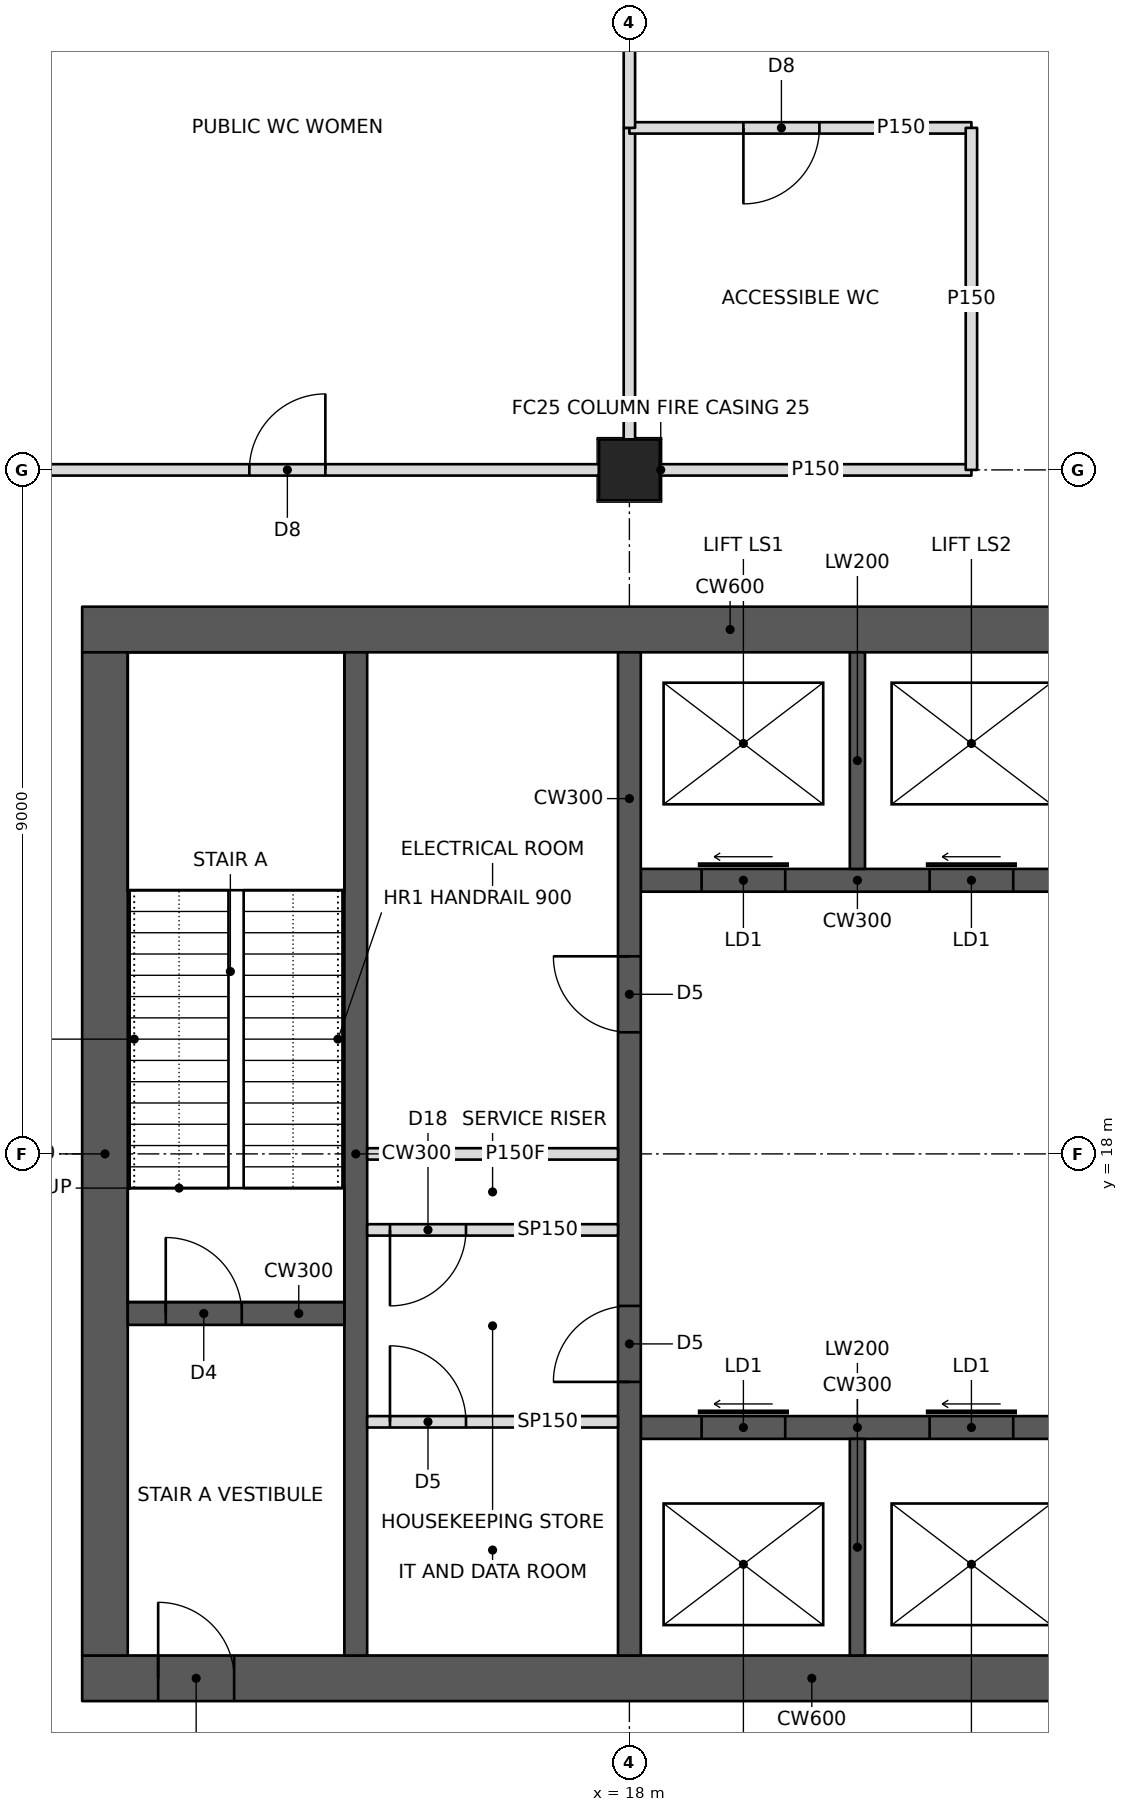
"""IFC4 building model, lengths in metres.
Left out: names, types, materials, properties, quantities, classifications, styles, units other than length and angle.
Written with IfcOpenShell. Run it as: python <this file> out.ifc"""

import sys

from ifc_helpers import new_model, si_unit, direction, frame, frame_2d, origin, origin_2d, place, context, subcontext, project, spatial, rectangle, hollow_rectangle, extrude, element, fill, save


model = new_model("IFC4")
c1 = context("Model", 3, precision=1e-05, world=origin(), true_north=direction((0.0, 1.0)))
c2 = subcontext(c1, "Body", "Model", "MODEL_VIEW")
j1 = project(units=[si_unit("LENGTHUNIT", "METRE"), si_unit("PLANEANGLEUNIT", "RADIAN")], contexts=[c1])
p1 = place(None, origin())
s1 = spatial("IfcSite", under=j1, at=p1, CompositionType="ELEMENT")
p2 = place(p1, origin())
s2 = spatial("IfcBuilding", under=s1, at=p2, CompositionType="ELEMENT")
p3 = place(p2, frame((0.0, 0.0, 23.0)))
s3 = spatial("IfcBuildingStorey", under=s2, at=p3, CompositionType="ELEMENT", Elevation=23.0)
p4 = place(p3, frame((18.0, 27.0, 0.0), z_axis=(0.0, 0.0, 1.0), x_axis=(1.0, 0.0, 0.0)))
e1 = element("IfcColumn", 1, at=p4, inside=s3, PredefinedType="COLUMN", context=c2, shape_type="SweptSolid", body=[
    extrude(hollow_rectangle(XDim=0.8, YDim=0.8, WallThickness=0.1, at=origin_2d()), origin(), (0.0, 0.0, 1.0), 5.0),
])
p5 = place(p3, frame((10.8, 11.1, 0.0), z_axis=(0.0, 0.0, 1.0), x_axis=(1.0, 0.0, 0.0)))
e2 = element("IfcWall", 2, at=p5, inside=s3, PredefinedType="SHEAR", context=c2, shape_type="SweptSolid", body=[
    extrude(rectangle(XDim=23.4, YDim=0.6, at=frame_2d((11.7, 0.0))), origin(), (0.0, 0.0, 1.0), 5.0),
])
p6 = place(p5, frame((1.0, 0.0, 0.0)))
e3 = element("IfcOpeningElement", 3, at=p6, cuts=e2, PredefinedType="OPENING", context=c2, shape_type="SweptSolid", body=[
    extrude(rectangle(XDim=1.0, YDim=2.1, at=frame_2d((0.5, 1.05))), frame((0.0, 0.31, 0.0), z_axis=(0.0, -1.0, 0.0), x_axis=(1.0, 0.0, 0.0)), (0.0, 0.0, 1.0), 0.62),
])
p7 = place(p5, frame((17.2, 0.0, 0.0)))
e4 = element("IfcOpeningElement", 4, at=p7, cuts=e2, PredefinedType="OPENING", context=c2, shape_type="SweptSolid", body=[
    extrude(rectangle(XDim=1.8, YDim=2.1, at=frame_2d((0.9, 1.05))), frame((0.0, 0.31, 0.0), z_axis=(0.0, -1.0, 0.0), x_axis=(1.0, 0.0, 0.0)), (0.0, 0.0, 1.0), 0.62),
])
p8 = place(p3, frame((10.8, 24.9, 0.0), z_axis=(0.0, 0.0, 1.0), x_axis=(1.0, 0.0, 0.0)))
e5 = element("IfcWall", 5, at=p8, inside=s3, PredefinedType="SHEAR", context=c2, shape_type="SweptSolid", body=[
    extrude(rectangle(XDim=23.4, YDim=0.6, at=frame_2d((11.7, 0.0))), origin(), (0.0, 0.0, 1.0), 5.0),
])
p9 = place(p8, frame((17.2, 0.0, 0.0)))
e6 = element("IfcOpeningElement", 6, at=p9, cuts=e5, PredefinedType="OPENING", context=c2, shape_type="SweptSolid", body=[
    extrude(rectangle(XDim=1.8, YDim=2.1, at=frame_2d((0.9, 1.05))), frame((0.0, 0.31, 0.0), z_axis=(0.0, -1.0, 0.0), x_axis=(1.0, 0.0, 0.0)), (0.0, 0.0, 1.0), 0.62),
])
p10 = place(p8, frame((21.1, 0.0, 0.0)))
e7 = element("IfcOpeningElement", 7, at=p10, cuts=e5, PredefinedType="OPENING", context=c2, shape_type="SweptSolid", body=[
    extrude(rectangle(XDim=1.0, YDim=2.1, at=frame_2d((0.5, 1.05))), frame((0.0, 0.31, 0.0), z_axis=(0.0, -1.0, 0.0), x_axis=(1.0, 0.0, 0.0)), (0.0, 0.0, 1.0), 0.62),
])
p11 = place(p3, frame((11.1, 11.4, 0.0), z_axis=(0.0, 0.0, 1.0), x_axis=(0.0, 1.0, 0.0)))
e8 = element("IfcWall", 8, at=p11, inside=s3, PredefinedType="SHEAR", context=c2, shape_type="SweptSolid", body=[
    extrude(rectangle(XDim=13.2, YDim=0.6, at=frame_2d((6.6, 0.0))), origin(), (0.0, 0.0, 1.0), 5.0),
])
p12 = place(p3, frame((14.4, 11.4, 0.0), z_axis=(0.0, 0.0, 1.0), x_axis=(0.0, 1.0, 0.0)))
e9 = element("IfcWall", 9, at=p12, inside=s3, PredefinedType="SHEAR", context=c2, shape_type="SweptSolid", body=[
    extrude(rectangle(XDim=13.2, YDim=0.3, at=frame_2d((6.6, 0.0))), origin(), (0.0, 0.0, 1.0), 5.0),
])
p13 = place(p3, frame((11.4, 15.9, 0.0), z_axis=(0.0, 0.0, 1.0), x_axis=(1.0, 0.0, 0.0)))
e10 = element("IfcWall", 10, at=p13, inside=s3, PredefinedType="SHEAR", context=c2, shape_type="SweptSolid", body=[
    extrude(rectangle(XDim=2.85, YDim=0.3, at=frame_2d((1.425, 0.0))), origin(), (0.0, 0.0, 1.0), 5.0),
])
p14 = place(p13, frame((0.5, 0.0, 0.0)))
e11 = element("IfcOpeningElement", 11, at=p14, cuts=e10, PredefinedType="OPENING", context=c2, shape_type="SweptSolid", body=[
    extrude(rectangle(XDim=1.0, YDim=2.1, at=frame_2d((0.5, 1.05))), frame((0.0, 0.16, 0.0), z_axis=(0.0, -1.0, 0.0), x_axis=(1.0, 0.0, 0.0)), (0.0, 0.0, 1.0), 0.32),
])
p15 = place(p3, frame((18.0, 11.4, 0.0), z_axis=(0.0, 0.0, 1.0), x_axis=(0.0, 1.0, 0.0)))
e12 = element("IfcWall", 12, at=p15, inside=s3, PredefinedType="SHEAR", context=c2, shape_type="SweptSolid", body=[
    extrude(rectangle(XDim=13.2, YDim=0.3, at=frame_2d((6.6, 0.0))), origin(), (0.0, 0.0, 1.0), 5.0),
])
p16 = place(p15, frame((3.6, 0.0, 0.0)))
e13 = element("IfcOpeningElement", 13, at=p16, cuts=e12, PredefinedType="OPENING", context=c2, shape_type="SweptSolid", body=[
    extrude(rectangle(XDim=1.0, YDim=2.1, at=frame_2d((0.5, 1.05))), frame((0.0, 0.16, 0.0), z_axis=(0.0, -1.0, 0.0), x_axis=(1.0, 0.0, 0.0)), (0.0, 0.0, 1.0), 0.32),
])
p17 = place(p15, frame((8.2, 0.0, 0.0)))
e14 = element("IfcOpeningElement", 14, at=p17, cuts=e12, PredefinedType="OPENING", context=c2, shape_type="SweptSolid", body=[
    extrude(rectangle(XDim=1.0, YDim=2.1, at=frame_2d((0.5, 1.05))), frame((0.0, 0.16, 0.0), z_axis=(0.0, -1.0, 0.0), x_axis=(1.0, 0.0, 0.0)), (0.0, 0.0, 1.0), 0.32),
])
p18 = place(p3, frame((14.55, 18.0, 0.0), z_axis=(0.0, 0.0, 1.0), x_axis=(1.0, 0.0, 0.0)))
e15 = element("IfcWall", 15, at=p18, inside=s3, PredefinedType="PARTITIONING", context=c2, shape_type="SweptSolid", body=[
    extrude(rectangle(XDim=3.3, YDim=0.15, at=frame_2d((1.65, 0.0))), origin(), (0.0, 0.0, 1.0), 4.8),
])
p19 = place(p3, frame((18.15, 14.4, 0.0), z_axis=(0.0, 0.0, 1.0), x_axis=(1.0, 0.0, 0.0)))
e16 = element("IfcWall", 16, at=p19, inside=s3, PredefinedType="SHEAR", context=c2, shape_type="SweptSolid", body=[
    extrude(rectangle(XDim=9.0, YDim=0.3, at=frame_2d((4.5, 0.0))), origin(), (0.0, 0.0, 1.0), 5.0),
])
p20 = place(p19, frame((0.8, 0.0, 0.0)))
e17 = element("IfcOpeningElement", 17, at=p20, cuts=e16, PredefinedType="OPENING", context=c2, shape_type="SweptSolid", body=[
    extrude(rectangle(XDim=1.1, YDim=2.1, at=frame_2d((0.55, 1.05))), frame((0.0, 0.16, 0.0), z_axis=(0.0, -1.0, 0.0), x_axis=(1.0, 0.0, 0.0)), (0.0, 0.0, 1.0), 0.32),
])
p21 = place(p19, frame((3.8, 0.0, 0.0)))
e18 = element("IfcOpeningElement", 18, at=p21, cuts=e16, PredefinedType="OPENING", context=c2, shape_type="SweptSolid", body=[
    extrude(rectangle(XDim=1.1, YDim=2.1, at=frame_2d((0.55, 1.05))), frame((0.0, 0.16, 0.0), z_axis=(0.0, -1.0, 0.0), x_axis=(1.0, 0.0, 0.0)), (0.0, 0.0, 1.0), 0.32),
])
p22 = place(p19, frame((6.75, 0.0, 0.0)))
e19 = element("IfcOpeningElement", 19, at=p22, cuts=e16, PredefinedType="OPENING", context=c2, shape_type="SweptSolid", body=[
    extrude(rectangle(XDim=1.2, YDim=2.1, at=frame_2d((0.6, 1.05))), frame((0.0, 0.16, 0.0), z_axis=(0.0, -1.0, 0.0), x_axis=(1.0, 0.0, 0.0)), (0.0, 0.0, 1.0), 0.32),
])
p23 = place(p3, frame((21.0, 11.4, 0.0), z_axis=(0.0, 0.0, 1.0), x_axis=(0.0, 1.0, 0.0)))
e20 = element("IfcWall", 20, at=p23, inside=s3, PredefinedType="SHEAR", context=c2, shape_type="SweptSolid", body=[
    extrude(rectangle(XDim=2.85, YDim=0.2, at=frame_2d((1.425, 0.0))), origin(), (0.0, 0.0, 1.0), 5.0),
])
p24 = place(p3, frame((18.15, 21.6, 0.0), z_axis=(0.0, 0.0, 1.0), x_axis=(1.0, 0.0, 0.0)))
e21 = element("IfcWall", 21, at=p24, inside=s3, PredefinedType="SHEAR", context=c2, shape_type="SweptSolid", body=[
    extrude(rectangle(XDim=9.0, YDim=0.3, at=frame_2d((4.5, 0.0))), origin(), (0.0, 0.0, 1.0), 5.0),
])
p25 = place(p24, frame((0.8, 0.0, 0.0)))
e22 = element("IfcOpeningElement", 22, at=p25, cuts=e21, PredefinedType="OPENING", context=c2, shape_type="SweptSolid", body=[
    extrude(rectangle(XDim=1.1, YDim=2.1, at=frame_2d((0.55, 1.05))), frame((0.0, 0.16, 0.0), z_axis=(0.0, -1.0, 0.0), x_axis=(1.0, 0.0, 0.0)), (0.0, 0.0, 1.0), 0.32),
])
p26 = place(p24, frame((3.8, 0.0, 0.0)))
e23 = element("IfcOpeningElement", 23, at=p26, cuts=e21, PredefinedType="OPENING", context=c2, shape_type="SweptSolid", body=[
    extrude(rectangle(XDim=1.1, YDim=2.1, at=frame_2d((0.55, 1.05))), frame((0.0, 0.16, 0.0), z_axis=(0.0, -1.0, 0.0), x_axis=(1.0, 0.0, 0.0)), (0.0, 0.0, 1.0), 0.32),
])
p27 = place(p24, frame((6.75, 0.0, 0.0)))
e24 = element("IfcOpeningElement", 24, at=p27, cuts=e21, PredefinedType="OPENING", context=c2, shape_type="SweptSolid", body=[
    extrude(rectangle(XDim=1.2, YDim=2.1, at=frame_2d((0.6, 1.05))), frame((0.0, 0.16, 0.0), z_axis=(0.0, -1.0, 0.0), x_axis=(1.0, 0.0, 0.0)), (0.0, 0.0, 1.0), 0.32),
])
p28 = place(p3, frame((21.0, 21.75, 0.0), z_axis=(0.0, 0.0, 1.0), x_axis=(0.0, 1.0, 0.0)))
e25 = element("IfcWall", 25, at=p28, inside=s3, PredefinedType="SHEAR", context=c2, shape_type="SweptSolid", body=[
    extrude(rectangle(XDim=2.85, YDim=0.2, at=frame_2d((1.425, 0.0))), origin(), (0.0, 0.0, 1.0), 5.0),
])
p29 = place(p3, frame((17.6, 27.0, 0.0), z_axis=(0.0, 0.0, 1.0), x_axis=(-1.0, 0.0, 0.0)))
e26 = element("IfcWall", 26, at=p29, inside=s3, PredefinedType="PARTITIONING", context=c2, shape_type="SweptSolid", body=[
    extrude(rectangle(XDim=8.2, YDim=0.15, at=frame_2d((4.1, 0.0))), origin(), (0.0, 0.0, 1.0), 4.005),
])
p30 = place(p29, frame((3.6, 0.0, 0.0)))
e27 = element("IfcOpeningElement", 27, at=p30, cuts=e26, PredefinedType="OPENING", context=c2, shape_type="SweptSolid", body=[
    extrude(rectangle(XDim=1.0, YDim=2.1, at=frame_2d((0.5, 1.05))), frame((0.0, 0.085, 0.0), z_axis=(0.0, -1.0, 0.0), x_axis=(1.0, 0.0, 0.0)), (0.0, 0.0, 1.0), 0.17),
])
for number, where, z_axis, x_axis in (
    (28, (22.5, 27.0, 0.0), (0.0, 0.0, 1.0), (-1.0, 0.0, 0.0)),
    (29, (18.0, 31.5, 0.0), (0.0, 0.0, 1.0), (0.0, -1.0, 0.0)),
):
    element("IfcWall", number, at=place(p3, frame(where, z_axis=z_axis, x_axis=x_axis)), inside=s3, PredefinedType="PARTITIONING", context=c2, shape_type="SweptSolid", body=[
        extrude(rectangle(XDim=4.1, YDim=0.15, at=frame_2d((2.05, 0.0))), origin(), (0.0, 0.0, 1.0), 4.005),
    ])
p31 = place(p3, frame((18.0, 31.5, 0.0), z_axis=(0.0, 0.0, 1.0), x_axis=(1.0, 0.0, 0.0)))
e30 = element("IfcWall", 30, at=p31, inside=s3, PredefinedType="PARTITIONING", context=c2, shape_type="SweptSolid", body=[
    extrude(rectangle(XDim=4.5, YDim=0.15, at=frame_2d((2.25, 0.0))), origin(), (0.0, 0.0, 1.0), 4.004),
])
p32 = place(p31, frame((1.5, 0.0, 0.0)))
e31 = element("IfcOpeningElement", 31, at=p32, cuts=e30, PredefinedType="OPENING", context=c2, shape_type="SweptSolid", body=[
    extrude(rectangle(XDim=1.0, YDim=2.1, at=frame_2d((0.5, 1.05))), frame((0.0, 0.085, 0.0), z_axis=(0.0, -1.0, 0.0), x_axis=(1.0, 0.0, 0.0)), (0.0, 0.0, 1.0), 0.17),
])
p33 = place(p3, frame((18.0, 35.6, 0.0), z_axis=(0.0, 0.0, 1.0), x_axis=(0.0, -1.0, 0.0)))
e32 = element("IfcWall", 32, at=p33, inside=s3, PredefinedType="PARTITIONING", context=c2, shape_type="SweptSolid", body=[
    extrude(rectangle(XDim=4.1, YDim=0.15, at=frame_2d((2.05, 0.0))), origin(), (0.0, 0.0, 1.0), 4.005),
])
p34 = place(p3, frame((22.5, 31.5, 0.0), z_axis=(0.0, 0.0, 1.0), x_axis=(0.0, -1.0, 0.0)))
e33 = element("IfcWall", 33, at=p34, inside=s3, PredefinedType="PARTITIONING", context=c2, shape_type="SweptSolid", body=[
    extrude(rectangle(XDim=4.5, YDim=0.15, at=frame_2d((2.25, 0.0))), origin(), (0.0, 0.0, 1.0), 4.004),
])
p35 = place(p3, frame((14.55, 17.0, 0.0), z_axis=(0.0, 0.0, 1.0), x_axis=(1.0, 0.0, 0.0)))
e34 = element("IfcWall", 34, at=p35, inside=s3, PredefinedType="PARTITIONING", context=c2, shape_type="SweptSolid", body=[
    extrude(rectangle(XDim=3.3, YDim=0.15, at=frame_2d((1.65, 0.0))), origin(), (0.0, 0.0, 1.0), 4.8),
])
p36 = place(p35, frame((0.3, 0.0, 0.0)))
e35 = element("IfcOpeningElement", 35, at=p36, cuts=e34, PredefinedType="OPENING", context=c2, shape_type="SweptSolid", body=[
    extrude(rectangle(XDim=1.0, YDim=2.1, at=frame_2d((0.5, 1.05))), frame((0.0, 0.085, 0.0), z_axis=(0.0, -1.0, 0.0), x_axis=(1.0, 0.0, 0.0)), (0.0, 0.0, 1.0), 0.17),
])
p37 = place(p3, frame((14.55, 14.475, 0.0), z_axis=(0.0, 0.0, 1.0), x_axis=(1.0, 0.0, 0.0)))
e36 = element("IfcWall", 36, at=p37, inside=s3, PredefinedType="PARTITIONING", context=c2, shape_type="SweptSolid", body=[
    extrude(rectangle(XDim=3.3, YDim=0.15, at=frame_2d((1.65, 0.0))), origin(), (0.0, 0.0, 1.0), 4.8),
])
p38 = place(p37, frame((0.3, 0.0, 0.0)))
e37 = element("IfcOpeningElement", 37, at=p38, cuts=e36, PredefinedType="OPENING", context=c2, shape_type="SweptSolid", body=[
    extrude(rectangle(XDim=1.0, YDim=2.1, at=frame_2d((0.5, 1.05))), frame((0.0, 0.085, 0.0), z_axis=(0.0, -1.0, 0.0), x_axis=(1.0, 0.0, 0.0)), (0.0, 0.0, 1.0), 0.17),
])
p39 = place(p30, frame((1.0, 0.0, 0.0), z_axis=(0.0, 0.0, 1.0), x_axis=(-1.0, 0.0, 0.0)))
e38 = element("IfcDoor", 38, at=p39, inside=s3, OperationType="SINGLE_SWING_RIGHT", PredefinedType="DOOR", context=c2, shape_type="SweptSolid", body=[
    extrude(rectangle(XDim=1.0, YDim=2.1, at=frame_2d((0.5, 1.05))), frame((0.0, 0.025, 0.0), z_axis=(0.0, -1.0, 0.0), x_axis=(1.0, 0.0, 0.0)), (0.0, 0.0, 1.0), 0.05),
])
fill(e27, e38)
p40 = place(p32, frame((1.0, 0.0, 0.0), z_axis=(0.0, 0.0, 1.0), x_axis=(-1.0, 0.0, 0.0)))
e39 = element("IfcDoor", 39, at=p40, inside=s3, OperationType="SINGLE_SWING_RIGHT", PredefinedType="DOOR", context=c2, shape_type="SweptSolid", body=[
    extrude(rectangle(XDim=1.0, YDim=2.1, at=frame_2d((0.5, 1.05))), frame((0.0, 0.025, 0.0), z_axis=(0.0, -1.0, 0.0), x_axis=(1.0, 0.0, 0.0)), (0.0, 0.0, 1.0), 0.05),
])
fill(e31, e39)
p41 = place(p36, frame((1.0, 0.0, 0.0), z_axis=(0.0, 0.0, 1.0), x_axis=(-1.0, 0.0, 0.0)))
e40 = element("IfcDoor", 40, at=p41, inside=s3, OperationType="SINGLE_SWING_RIGHT", PredefinedType="DOOR", context=c2, shape_type="SweptSolid", body=[
    extrude(rectangle(XDim=1.0, YDim=2.1, at=frame_2d((0.5, 1.05))), frame((0.0, 0.025, 0.0), z_axis=(0.0, -1.0, 0.0), x_axis=(1.0, 0.0, 0.0)), (0.0, 0.0, 1.0), 0.05),
])
fill(e35, e40)
p42 = place(p38, origin())
e41 = element("IfcDoor", 41, at=p42, inside=s3, OperationType="SINGLE_SWING_LEFT", PredefinedType="DOOR", context=c2, shape_type="SweptSolid", body=[
    extrude(rectangle(XDim=1.0, YDim=2.1, at=frame_2d((0.5, 1.05))), frame((0.0, 0.025, 0.0), z_axis=(0.0, -1.0, 0.0), x_axis=(1.0, 0.0, 0.0)), (0.0, 0.0, 1.0), 0.05),
])
fill(e37, e41)
p43 = place(p6, origin())
e42 = element("IfcDoor", 42, at=p43, inside=s3, OperationType="SINGLE_SWING_LEFT", PredefinedType="DOOR", context=c2, shape_type="SweptSolid", body=[
    extrude(rectangle(XDim=1.0, YDim=2.1, at=frame_2d((0.5, 1.05))), frame((0.0, 0.025, 0.0), z_axis=(0.0, -1.0, 0.0), x_axis=(1.0, 0.0, 0.0)), (0.0, 0.0, 1.0), 0.05),
])
fill(e3, e42)
p44 = place(p14, origin())
e43 = element("IfcDoor", 43, at=p44, inside=s3, OperationType="SINGLE_SWING_LEFT", PredefinedType="DOOR", context=c2, shape_type="SweptSolid", body=[
    extrude(rectangle(XDim=1.0, YDim=2.1, at=frame_2d((0.5, 1.05))), frame((0.0, 0.025, 0.0), z_axis=(0.0, -1.0, 0.0), x_axis=(1.0, 0.0, 0.0)), (0.0, 0.0, 1.0), 0.05),
])
fill(e11, e43)
p45 = place(p16, origin())
e44 = element("IfcDoor", 44, at=p45, inside=s3, OperationType="SINGLE_SWING_LEFT", PredefinedType="DOOR", context=c2, shape_type="SweptSolid", body=[
    extrude(rectangle(XDim=1.0, YDim=2.1, at=frame_2d((0.5, 1.05))), frame((0.0, 0.025, 0.0), z_axis=(0.0, -1.0, 0.0), x_axis=(1.0, 0.0, 0.0)), (0.0, 0.0, 1.0), 0.05),
])
fill(e13, e44)
p46 = place(p17, origin())
e45 = element("IfcDoor", 45, at=p46, inside=s3, OperationType="SINGLE_SWING_RIGHT", PredefinedType="DOOR", context=c2, shape_type="SweptSolid", body=[
    extrude(rectangle(XDim=1.0, YDim=2.1, at=frame_2d((0.5, 1.05))), frame((0.0, 0.025, 0.0), z_axis=(0.0, -1.0, 0.0), x_axis=(1.0, 0.0, 0.0)), (0.0, 0.0, 1.0), 0.05),
])
fill(e14, e45)
p47 = place(p20, origin())
e46 = element("IfcDoor", 46, at=p47, inside=s3, OperationType="SLIDING_TO_LEFT", PredefinedType="DOOR", context=c2, shape_type="SweptSolid", body=[
    extrude(rectangle(XDim=1.1, YDim=2.1, at=frame_2d((0.55, 1.05))), frame((0.0, 0.025, 0.0), z_axis=(0.0, -1.0, 0.0), x_axis=(1.0, 0.0, 0.0)), (0.0, 0.0, 1.0), 0.05),
])
fill(e17, e46)
p48 = place(p21, origin())
e47 = element("IfcDoor", 47, at=p48, inside=s3, OperationType="SLIDING_TO_LEFT", PredefinedType="DOOR", context=c2, shape_type="SweptSolid", body=[
    extrude(rectangle(XDim=1.1, YDim=2.1, at=frame_2d((0.55, 1.05))), frame((0.0, 0.025, 0.0), z_axis=(0.0, -1.0, 0.0), x_axis=(1.0, 0.0, 0.0)), (0.0, 0.0, 1.0), 0.05),
])
fill(e18, e47)
p49 = place(p25, origin())
e48 = element("IfcDoor", 48, at=p49, inside=s3, OperationType="SLIDING_TO_LEFT", PredefinedType="DOOR", context=c2, shape_type="SweptSolid", body=[
    extrude(rectangle(XDim=1.1, YDim=2.1, at=frame_2d((0.55, 1.05))), frame((0.0, 0.025, 0.0), z_axis=(0.0, -1.0, 0.0), x_axis=(1.0, 0.0, 0.0)), (0.0, 0.0, 1.0), 0.05),
])
fill(e22, e48)
p50 = place(p26, origin())
e49 = element("IfcDoor", 49, at=p50, inside=s3, OperationType="SLIDING_TO_LEFT", PredefinedType="DOOR", context=c2, shape_type="SweptSolid", body=[
    extrude(rectangle(XDim=1.1, YDim=2.1, at=frame_2d((0.55, 1.05))), frame((0.0, 0.025, 0.0), z_axis=(0.0, -1.0, 0.0), x_axis=(1.0, 0.0, 0.0)), (0.0, 0.0, 1.0), 0.05),
])
fill(e23, e49)
save(model, sys.argv[1])
